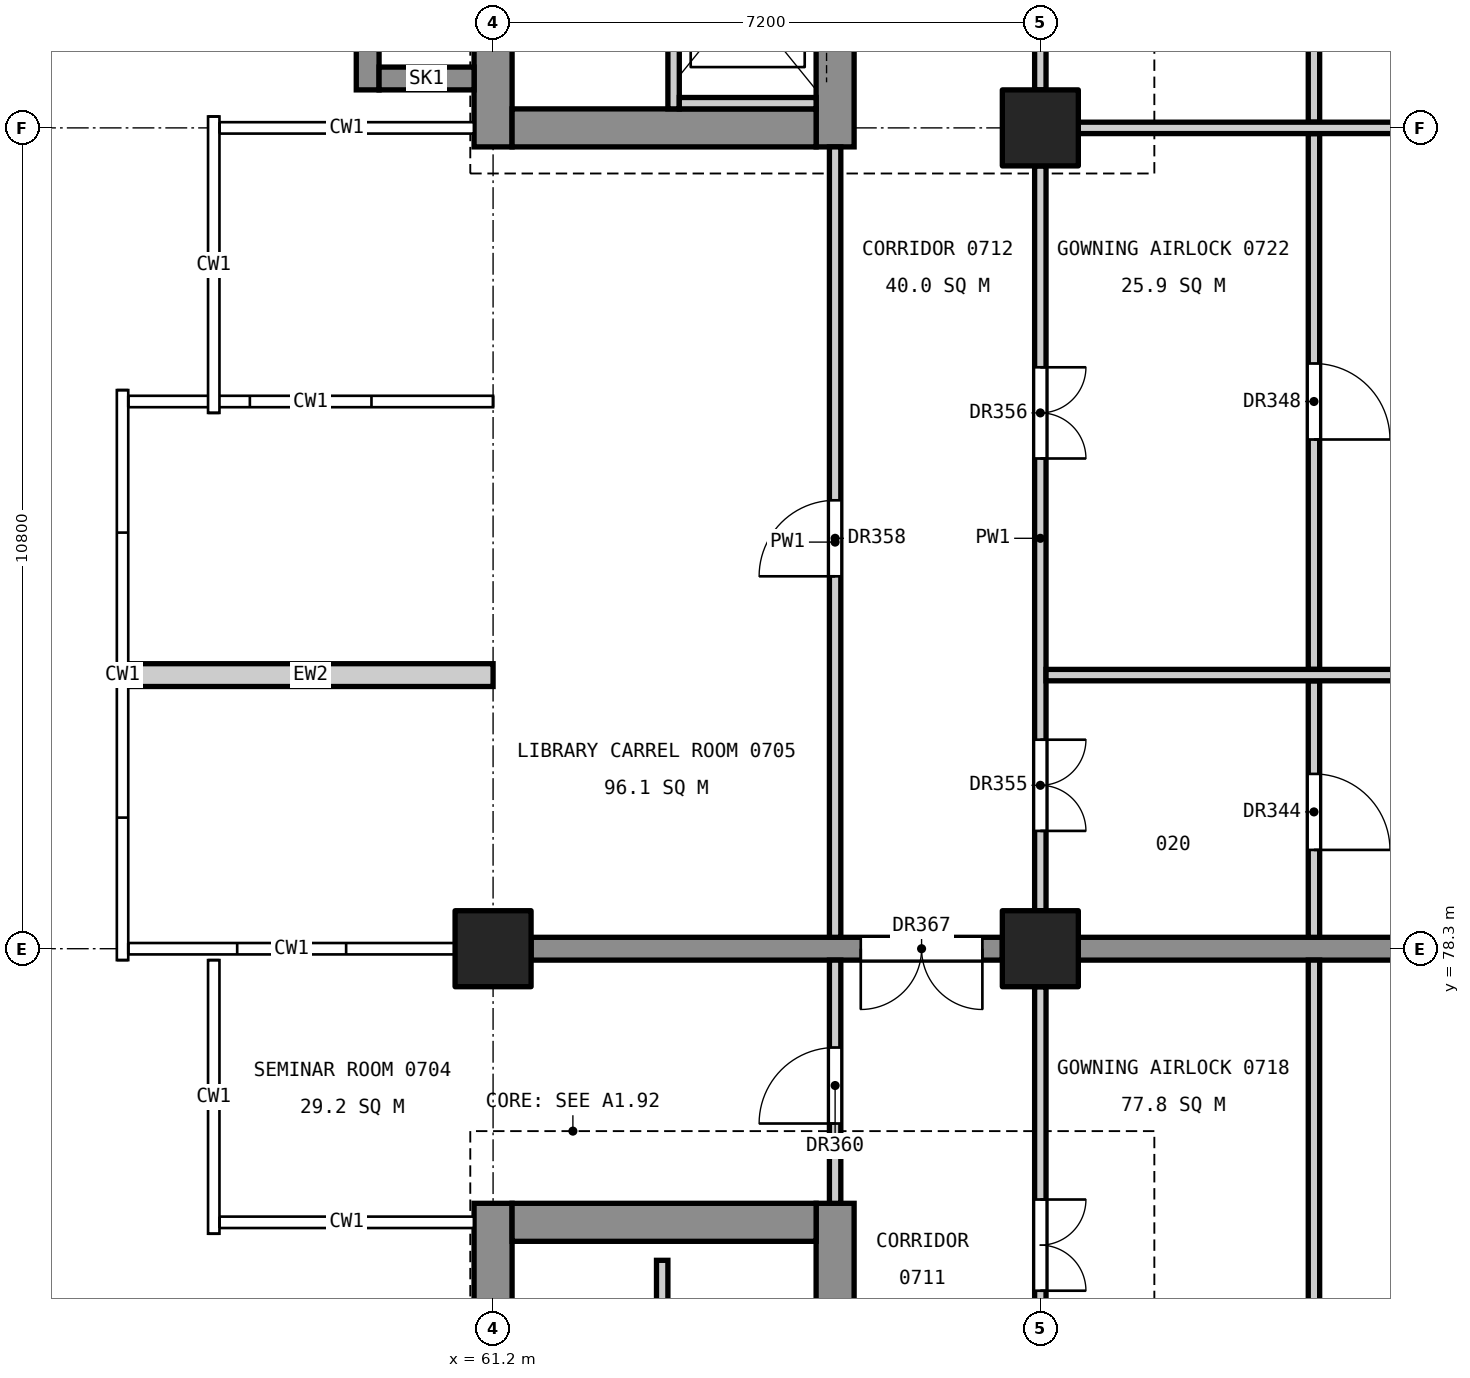
"""IFC4 building model, lengths in metres.
Left out: names, types, materials, properties, quantities, classifications, styles, units other than length and angle.
Written with IfcOpenShell. Run it as: python <this file> out.ifc"""

import sys

from ifc_helpers import new_model, si_unit, direction, frame, frame_2d, origin, origin_2d, place, context, subcontext, project, spatial, rectangle, extrude, element, fill, save


model = new_model("IFC4")
c1 = context("Model", 3, precision=1e-05, world=origin(), true_north=direction((0.0, 1.0)))
c2 = subcontext(c1, "Body", "Model", "MODEL_VIEW")
j1 = project(units=[si_unit("LENGTHUNIT", "METRE"), si_unit("PLANEANGLEUNIT", "RADIAN")], contexts=[c1])
p1 = place(None, origin())
s1 = spatial("IfcSite", under=j1, at=p1, CompositionType="ELEMENT")
p2 = place(p1, origin())
s2 = spatial("IfcBuilding", under=s1, at=p2, CompositionType="ELEMENT")
p3 = place(p2, frame((0.0, 0.0, 36.6)))
s3 = spatial("IfcBuildingStorey", under=s2, at=p3, CompositionType="ELEMENT", Elevation=36.6)
for number, where, z_axis, x_axis in (
    (1, (61.2, 78.3, 0.0), (0.0, 0.0, 1.0), (1.0, 0.0, 0.0)),
    (2, (68.4, 78.3, 0.0), (0.0, 0.0, 1.0), (1.0, 0.0, 0.0)),
    (3, (68.4, 89.1, 0.0), (0.0, 0.0, 1.0), (1.0, 0.0, 0.0)),
):
    element("IfcColumn", number, at=place(p3, frame(where, z_axis=z_axis, x_axis=x_axis)), inside=s3, PredefinedType="COLUMN", context=c2, shape_type="SweptSolid", body=[
        extrude(rectangle(XDim=1.0, YDim=1.0, at=origin_2d()), origin(), (0.0, 0.0, 1.0), 4.8),
    ])
p4 = place(p3, frame((61.2, 60.05, 0.0), z_axis=(0.0, 0.0, 1.0), x_axis=(0.0, 1.0, 0.0)))
e4 = element("IfcWall", 4, at=p4, inside=s3, PredefinedType="SHEAR", context=c2, shape_type="SweptSolid", body=[
    extrude(rectangle(XDim=14.9, YDim=0.5, at=frame_2d((7.45, 0.0))), origin(), (0.0, 0.0, 1.0), 4.55),
])
p5 = place(p4, frame((6.16, 0.0, 3.4)))
e5 = element("IfcOpeningElement", 5, at=p5, cuts=e4, PredefinedType="OPENING", context=c2, shape_type="SweptSolid", body=[
    extrude(rectangle(XDim=1.2, YDim=0.9, at=frame_2d((0.6, 0.45))), frame((0.0, 0.26, 0.0), z_axis=(0.0, -1.0, 0.0), x_axis=(1.0, 0.0, 0.0)), (0.0, 0.0, 1.0), 0.52),
])
p6 = place(p3, frame((65.7, 60.05, 0.0), z_axis=(0.0, 0.0, 1.0), x_axis=(0.0, 1.0, 0.0)))
e6 = element("IfcWall", 6, at=p6, inside=s3, PredefinedType="SHEAR", context=c2, shape_type="SweptSolid", body=[
    extrude(rectangle(XDim=14.9, YDim=0.5, at=frame_2d((7.45, 0.0))), origin(), (0.0, 0.0, 1.0), 4.55),
])
p7 = place(p6, frame((0.55, 0.0, 0.0)))
e7 = element("IfcOpeningElement", 7, at=p7, cuts=e6, PredefinedType="OPENING", context=c2, shape_type="SweptSolid", body=[
    extrude(rectangle(XDim=1.4, YDim=2.1, at=frame_2d((0.7, 1.05))), frame((0.0, 0.26, 0.0), z_axis=(0.0, -1.0, 0.0), x_axis=(1.0, 0.0, 0.0)), (0.0, 0.0, 1.0), 0.52),
])
p8 = place(p6, frame((8.85, 0.0, 0.0)))
e8 = element("IfcOpeningElement", 8, at=p8, cuts=e6, PredefinedType="OPENING", context=c2, shape_type="SweptSolid", body=[
    extrude(rectangle(XDim=1.1, YDim=2.1, at=frame_2d((0.55, 1.05))), frame((0.0, 0.26, 0.0), z_axis=(0.0, -1.0, 0.0), x_axis=(1.0, 0.0, 0.0)), (0.0, 0.0, 1.0), 0.52),
])
p9 = place(p6, frame((11.4, 0.0, 0.0)))
e9 = element("IfcOpeningElement", 9, at=p9, cuts=e6, PredefinedType="OPENING", context=c2, shape_type="SweptSolid", body=[
    extrude(rectangle(XDim=1.1, YDim=2.1, at=frame_2d((0.55, 1.05))), frame((0.0, 0.26, 0.0), z_axis=(0.0, -1.0, 0.0), x_axis=(1.0, 0.0, 0.0)), (0.0, 0.0, 1.0), 0.52),
])
p10 = place(p3, frame((61.45, 74.7, 0.0), z_axis=(0.0, 0.0, 1.0), x_axis=(1.0, 0.0, 0.0)))
e10 = element("IfcWall", 10, at=p10, inside=s3, PredefinedType="SHEAR", context=c2, shape_type="SweptSolid", body=[
    extrude(rectangle(XDim=4.0, YDim=0.5, at=frame_2d((2.0, 0.0))), origin(), (0.0, 0.0, 1.0), 4.55),
])
p11 = place(p3, frame((61.2, 88.85, 0.0), z_axis=(0.0, 0.0, 1.0), x_axis=(0.0, 1.0, 0.0)))
e11 = element("IfcWall", 11, at=p11, inside=s3, PredefinedType="SHEAR", context=c2, shape_type="SweptSolid", body=[
    extrude(rectangle(XDim=11.3, YDim=0.5, at=frame_2d((5.65, 0.0))), origin(), (0.0, 0.0, 1.0), 4.55),
])
p12 = place(p11, frame((3.94, 0.0, 3.4)))
e12 = element("IfcOpeningElement", 12, at=p12, cuts=e11, PredefinedType="OPENING", context=c2, shape_type="SweptSolid", body=[
    extrude(rectangle(XDim=1.2, YDim=0.9, at=frame_2d((0.6, 0.45))), frame((0.0, 0.26, 0.0), z_axis=(0.0, -1.0, 0.0), x_axis=(1.0, 0.0, 0.0)), (0.0, 0.0, 1.0), 0.52),
])
p13 = place(p3, frame((65.7, 88.85, 0.0), z_axis=(0.0, 0.0, 1.0), x_axis=(0.0, 1.0, 0.0)))
e13 = element("IfcWall", 13, at=p13, inside=s3, PredefinedType="SHEAR", context=c2, shape_type="SweptSolid", body=[
    extrude(rectangle(XDim=11.3, YDim=0.5, at=frame_2d((5.65, 0.0))), origin(), (0.0, 0.0, 1.0), 4.55),
])
p14 = place(p13, frame((9.35, 0.0, 0.0)))
e14 = element("IfcOpeningElement", 14, at=p14, cuts=e13, PredefinedType="OPENING", context=c2, shape_type="SweptSolid", body=[
    extrude(rectangle(XDim=1.4, YDim=2.1, at=frame_2d((0.7, 1.05))), frame((0.0, 0.26, 0.0), z_axis=(0.0, -1.0, 0.0), x_axis=(1.0, 0.0, 0.0)), (0.0, 0.0, 1.0), 0.52),
])
p15 = place(p13, frame((1.4, 0.0, 0.0)))
e15 = element("IfcOpeningElement", 15, at=p15, cuts=e13, PredefinedType="OPENING", context=c2, shape_type="SweptSolid", body=[
    extrude(rectangle(XDim=1.1, YDim=2.1, at=frame_2d((0.55, 1.05))), frame((0.0, 0.26, 0.0), z_axis=(0.0, -1.0, 0.0), x_axis=(1.0, 0.0, 0.0)), (0.0, 0.0, 1.0), 0.52),
])
p16 = place(p3, frame((61.45, 89.1, 0.0), z_axis=(0.0, 0.0, 1.0), x_axis=(1.0, 0.0, 0.0)))
e16 = element("IfcWall", 16, at=p16, inside=s3, PredefinedType="SHEAR", context=c2, shape_type="SweptSolid", body=[
    extrude(rectangle(XDim=4.0, YDim=0.5, at=frame_2d((2.0, 0.0))), origin(), (0.0, 0.0, 1.0), 4.55),
])
p17 = place(p3, frame((59.55, 89.6, 0.0), z_axis=(0.0, 0.0, 1.0), x_axis=(0.0, 1.0, 0.0)))
e17 = element("IfcWall", 17, at=p17, inside=s3, PredefinedType="SHEAR", context=c2, shape_type="SweptSolid", body=[
    extrude(rectangle(XDim=2.4, YDim=0.3, at=frame_2d((1.2, 0.0))), origin(), (0.0, 0.0, 1.0), 4.8),
])
p18 = place(p3, frame((60.95, 89.75, 0.0), z_axis=(0.0, 0.0, 1.0), x_axis=(-1.0, 0.0, 0.0)))
e18 = element("IfcWall", 18, at=p18, inside=s3, PredefinedType="SHEAR", context=c2, shape_type="SweptSolid", body=[
    extrude(rectangle(XDim=1.25, YDim=0.3, at=frame_2d((0.625, 0.0))), origin(), (0.0, 0.0, 1.0), 4.8),
])
p19 = place(p3, frame((61.7, 78.3, 0.0), z_axis=(0.0, 0.0, 1.0), x_axis=(1.0, 0.0, 0.0)))
e19 = element("IfcWall", 19, at=p19, inside=s3, PredefinedType="SHEAR", context=c2, shape_type="SweptSolid", body=[
    extrude(rectangle(XDim=6.2, YDim=0.3, at=frame_2d((3.1, 0.0))), origin(), (0.0, 0.0, 1.0), 4.55),
])
p20 = place(p19, frame((4.337, 0.0, 0.0)))
e20 = element("IfcOpeningElement", 20, at=p20, cuts=e19, PredefinedType="OPENING", context=c2, shape_type="SweptSolid", body=[
    extrude(rectangle(XDim=1.6, YDim=2.1, at=frame_2d((0.8, 1.05))), frame((0.0, 0.16, 0.0), z_axis=(0.0, -1.0, 0.0), x_axis=(1.0, 0.0, 0.0)), (0.0, 0.0, 1.0), 0.32),
])
p21 = place(p3, frame((68.9, 78.3, 0.0), z_axis=(0.0, 0.0, 1.0), x_axis=(1.0, 0.0, 0.0)))
e21 = element("IfcWall", 21, at=p21, inside=s3, PredefinedType="SHEAR", context=c2, shape_type="SweptSolid", body=[
    extrude(rectangle(XDim=9.8, YDim=0.3, at=frame_2d((4.9, 0.0))), origin(), (0.0, 0.0, 1.0), 4.55),
])
p22 = place(p3, frame((63.575, 92.0, 0.0), z_axis=(0.0, 0.0, 1.0), x_axis=(0.0, -1.0, 0.0)))
e22 = element("IfcWall", 22, at=p22, inside=s3, PredefinedType="SOLIDWALL", context=c2, shape_type="SweptSolid", body=[
    extrude(rectangle(XDim=2.65, YDim=0.15, at=frame_2d((1.325, 0.0))), origin(), (0.0, 0.0, 1.0), 4.8),
])
p23 = place(p3, frame((63.65, 89.425, 0.0), z_axis=(0.0, 0.0, 1.0), x_axis=(1.0, 0.0, 0.0)))
e23 = element("IfcWall", 23, at=p23, inside=s3, PredefinedType="SOLIDWALL", context=c2, shape_type="SweptSolid", body=[
    extrude(rectangle(XDim=1.8, YDim=0.15, at=frame_2d((0.9, 0.0))), origin(), (0.0, 0.0, 1.0), 4.8),
])
p24 = place(p3, frame((63.425, 73.3, 0.0), z_axis=(0.0, 0.0, 1.0), x_axis=(0.0, 1.0, 0.0)))
e24 = element("IfcWall", 24, at=p24, inside=s3, PredefinedType="SOLIDWALL", context=c2, shape_type="SweptSolid", body=[
    extrude(rectangle(XDim=0.9, YDim=0.15, at=frame_2d((0.45, 0.0))), origin(), (0.0, 0.0, 1.0), 4.8),
])
p25 = place(p3, frame((56.4, 81.9, 0.0), z_axis=(0.0, 0.0, 1.0), x_axis=(1.0, 0.0, 0.0)))
e25 = element("IfcWall", 25, at=p25, inside=s3, PredefinedType="STANDARD", context=c2, shape_type="SweptSolid", body=[
    extrude(rectangle(XDim=4.8, YDim=0.3, at=frame_2d((2.4, 0.0))), origin(), (0.0, 0.0, 1.0), 3.65),
])
p26 = place(p3, frame((65.7, 74.95, 0.0), z_axis=(0.0, 0.0, 1.0), x_axis=(0.0, 1.0, 0.0)))
e26 = element("IfcWall", 26, at=p26, inside=s3, PredefinedType="PARTITIONING", context=c2, shape_type="SweptSolid", body=[
    extrude(rectangle(XDim=3.2, YDim=0.15, at=frame_2d((1.6, 0.0))), origin(), (0.0, 0.0, 1.0), 3.55),
])
p27 = place(p26, frame((1.05, 0.0, 0.0)))
e27 = element("IfcOpeningElement", 27, at=p27, cuts=e26, PredefinedType="OPENING", context=c2, shape_type="SweptSolid", body=[
    extrude(rectangle(XDim=1.0, YDim=2.1, at=frame_2d((0.5, 1.05))), frame((0.0, 0.085, 0.0), z_axis=(0.0, -1.0, 0.0), x_axis=(1.0, 0.0, 0.0)), (0.0, 0.0, 1.0), 0.17),
])
p28 = place(p3, frame((65.7, 78.45, 0.0), z_axis=(0.0, 0.0, 1.0), x_axis=(0.0, 1.0, 0.0)))
e28 = element("IfcWall", 28, at=p28, inside=s3, PredefinedType="PARTITIONING", context=c2, shape_type="SweptSolid", body=[
    extrude(rectangle(XDim=10.4, YDim=0.15, at=frame_2d((5.2, 0.0))), origin(), (0.0, 0.0, 1.0), 3.55),
])
p29 = place(p28, frame((4.75, 0.0, 0.0)))
e29 = element("IfcOpeningElement", 29, at=p29, cuts=e28, PredefinedType="OPENING", context=c2, shape_type="SweptSolid", body=[
    extrude(rectangle(XDim=1.0, YDim=2.1, at=frame_2d((0.5, 1.05))), frame((0.0, 0.085, 0.0), z_axis=(0.0, -1.0, 0.0), x_axis=(1.0, 0.0, 0.0)), (0.0, 0.0, 1.0), 0.17),
])
p30 = place(p3, frame((68.4, 70.8, 0.0), z_axis=(0.0, 0.0, 1.0), x_axis=(0.0, 1.0, 0.0)))
e30 = element("IfcWall", 30, at=p30, inside=s3, PredefinedType="PARTITIONING", context=c2, shape_type="SweptSolid", body=[
    extrude(rectangle(XDim=7.0, YDim=0.15, at=frame_2d((3.5, 0.0))), origin(), (0.0, 0.0, 1.0), 3.55),
])
p31 = place(p30, frame((3.0, 0.0, 0.0)))
e31 = element("IfcOpeningElement", 31, at=p31, cuts=e30, PredefinedType="OPENING", context=c2, shape_type="SweptSolid", body=[
    extrude(rectangle(XDim=1.2, YDim=2.1, at=frame_2d((0.6, 1.05))), frame((0.0, 0.085, 0.0), z_axis=(0.0, -1.0, 0.0), x_axis=(1.0, 0.0, 0.0)), (0.0, 0.0, 1.0), 0.17),
])
p32 = place(p3, frame((68.4, 78.8, 0.0), z_axis=(0.0, 0.0, 1.0), x_axis=(0.0, 1.0, 0.0)))
e32 = element("IfcWall", 32, at=p32, inside=s3, PredefinedType="PARTITIONING", context=c2, shape_type="SweptSolid", body=[
    extrude(rectangle(XDim=9.8, YDim=0.15, at=frame_2d((4.9, 0.0))), origin(), (0.0, 0.0, 1.0), 3.55),
])
p33 = place(p32, frame((1.05, 0.0, 0.0)))
e33 = element("IfcOpeningElement", 33, at=p33, cuts=e32, PredefinedType="OPENING", context=c2, shape_type="SweptSolid", body=[
    extrude(rectangle(XDim=1.2, YDim=2.1, at=frame_2d((0.6, 1.05))), frame((0.0, 0.085, 0.0), z_axis=(0.0, -1.0, 0.0), x_axis=(1.0, 0.0, 0.0)), (0.0, 0.0, 1.0), 0.17),
])
p34 = place(p32, frame((5.95, 0.0, 0.0)))
e34 = element("IfcOpeningElement", 34, at=p34, cuts=e32, PredefinedType="OPENING", context=c2, shape_type="SweptSolid", body=[
    extrude(rectangle(XDim=1.2, YDim=2.1, at=frame_2d((0.6, 1.05))), frame((0.0, 0.085, 0.0), z_axis=(0.0, -1.0, 0.0), x_axis=(1.0, 0.0, 0.0)), (0.0, 0.0, 1.0), 0.17),
])
p35 = place(p3, frame((68.4, 89.6, 0.0), z_axis=(0.0, 0.0, 1.0), x_axis=(0.0, 1.0, 0.0)))
e35 = element("IfcWall", 35, at=p35, inside=s3, PredefinedType="PARTITIONING", context=c2, shape_type="SweptSolid", body=[
    extrude(rectangle(XDim=3.5, YDim=0.15, at=frame_2d((1.75, 0.0))), origin(), (0.0, 0.0, 1.0), 3.55),
])
p36 = place(p35, frame((1.25, 0.0, 0.0)))
e36 = element("IfcOpeningElement", 36, at=p36, cuts=e35, PredefinedType="OPENING", context=c2, shape_type="SweptSolid", body=[
    extrude(rectangle(XDim=1.2, YDim=2.1, at=frame_2d((0.6, 1.05))), frame((0.0, 0.085, 0.0), z_axis=(0.0, -1.0, 0.0), x_axis=(1.0, 0.0, 0.0)), (0.0, 0.0, 1.0), 0.17),
])
p37 = place(p3, frame((72.0, 56.85, 0.0), z_axis=(0.0, 0.0, 1.0), x_axis=(0.0, 1.0, 0.0)))
e37 = element("IfcWall", 37, at=p37, inside=s3, PredefinedType="PARTITIONING", context=c2, shape_type="SweptSolid", body=[
    extrude(rectangle(XDim=21.3, YDim=0.15, at=frame_2d((10.65, 0.0))), origin(), (0.0, 0.0, 1.0), 3.55),
])
p38 = place(p37, frame((10.15, 0.0, 0.0)))
e38 = element("IfcOpeningElement", 38, at=p38, cuts=e37, PredefinedType="OPENING", context=c2, shape_type="SweptSolid", body=[
    extrude(rectangle(XDim=1.0, YDim=2.1, at=frame_2d((0.5, 1.05))), frame((0.0, 0.085, 0.0), z_axis=(0.0, -1.0, 0.0), x_axis=(1.0, 0.0, 0.0)), (0.0, 0.0, 1.0), 0.17),
])
p39 = place(p3, frame((72.0, 78.45, 0.0), z_axis=(0.0, 0.0, 1.0), x_axis=(0.0, 1.0, 0.0)))
e39 = element("IfcWall", 39, at=p39, inside=s3, PredefinedType="PARTITIONING", context=c2, shape_type="SweptSolid", body=[
    extrude(rectangle(XDim=3.375, YDim=0.15, at=frame_2d((1.688, 0.0))), origin(), (0.0, 0.0, 1.0), 3.55),
])
p40 = place(p39, frame((1.15, 0.0, 0.0)))
e40 = element("IfcOpeningElement", 40, at=p40, cuts=e39, PredefinedType="OPENING", context=c2, shape_type="SweptSolid", body=[
    extrude(rectangle(XDim=1.0, YDim=2.1, at=frame_2d((0.5, 1.05))), frame((0.0, 0.085, 0.0), z_axis=(0.0, -1.0, 0.0), x_axis=(1.0, 0.0, 0.0)), (0.0, 0.0, 1.0), 0.17),
])
p41 = place(p3, frame((72.0, 81.975, 0.0), z_axis=(0.0, 0.0, 1.0), x_axis=(0.0, 1.0, 0.0)))
e41 = element("IfcWall", 41, at=p41, inside=s3, PredefinedType="PARTITIONING", context=c2, shape_type="SweptSolid", body=[
    extrude(rectangle(XDim=7.05, YDim=0.15, at=frame_2d((3.525, 0.0))), origin(), (0.0, 0.0, 1.0), 3.55),
])
p42 = place(p41, frame((3.025, 0.0, 0.0)))
e42 = element("IfcOpeningElement", 42, at=p42, cuts=e41, PredefinedType="OPENING", context=c2, shape_type="SweptSolid", body=[
    extrude(rectangle(XDim=1.0, YDim=2.1, at=frame_2d((0.5, 1.05))), frame((0.0, 0.085, 0.0), z_axis=(0.0, -1.0, 0.0), x_axis=(1.0, 0.0, 0.0)), (0.0, 0.0, 1.0), 0.17),
])
p43 = place(p3, frame((72.0, 89.175, 0.0), z_axis=(0.0, 0.0, 1.0), x_axis=(0.0, 1.0, 0.0)))
e43 = element("IfcWall", 43, at=p43, inside=s3, PredefinedType="PARTITIONING", context=c2, shape_type="SweptSolid", body=[
    extrude(rectangle(XDim=10.575, YDim=0.15, at=frame_2d((5.288, 0.0))), origin(), (0.0, 0.0, 1.0), 3.55),
])
p44 = place(p43, frame((4.825, 0.0, 0.0)))
e44 = element("IfcOpeningElement", 44, at=p44, cuts=e43, PredefinedType="OPENING", context=c2, shape_type="SweptSolid", body=[
    extrude(rectangle(XDim=1.0, YDim=2.1, at=frame_2d((0.5, 1.05))), frame((0.0, 0.085, 0.0), z_axis=(0.0, -1.0, 0.0), x_axis=(1.0, 0.0, 0.0)), (0.0, 0.0, 1.0), 0.17),
])
p45 = place(p3, frame((68.475, 81.9, 0.0), z_axis=(0.0, 0.0, 1.0), x_axis=(1.0, 0.0, 0.0)))
e45 = element("IfcWall", 45, at=p45, inside=s3, PredefinedType="PARTITIONING", context=c2, shape_type="SweptSolid", body=[
    extrude(rectangle(XDim=10.575, YDim=0.15, at=frame_2d((5.288, 0.0))), origin(), (0.0, 0.0, 1.0), 3.85),
])
p46 = place(p3, frame((68.9, 89.1, 0.0), z_axis=(0.0, 0.0, 1.0), x_axis=(1.0, 0.0, 0.0)))
e46 = element("IfcWall", 46, at=p46, inside=s3, PredefinedType="PARTITIONING", context=c2, shape_type="SweptSolid", body=[
    extrude(rectangle(XDim=9.8, YDim=0.15, at=frame_2d((4.9, 0.0))), origin(), (0.0, 0.0, 1.0), 3.85),
])
p47 = place(p40, frame((1.0, 0.0, 0.0), z_axis=(0.0, 0.0, 1.0), x_axis=(-1.0, 0.0, 0.0)))
e47 = element("IfcDoor", 47, at=p47, inside=s3, OperationType="SINGLE_SWING_RIGHT", PredefinedType="DOOR", context=c2, shape_type="SweptSolid", body=[
    extrude(rectangle(XDim=1.0, YDim=2.1, at=frame_2d((0.5, 1.05))), frame((0.0, 0.025, 0.0), z_axis=(0.0, -1.0, 0.0), x_axis=(1.0, 0.0, 0.0)), (0.0, 0.0, 1.0), 0.05),
])
fill(e40, e47)
p48 = place(p42, frame((1.0, 0.0, 0.0), z_axis=(0.0, 0.0, 1.0), x_axis=(-1.0, 0.0, 0.0)))
e48 = element("IfcDoor", 48, at=p48, inside=s3, OperationType="SINGLE_SWING_RIGHT", PredefinedType="DOOR", context=c2, shape_type="SweptSolid", body=[
    extrude(rectangle(XDim=1.0, YDim=2.1, at=frame_2d((0.5, 1.05))), frame((0.0, 0.025, 0.0), z_axis=(0.0, -1.0, 0.0), x_axis=(1.0, 0.0, 0.0)), (0.0, 0.0, 1.0), 0.05),
])
fill(e42, e48)
p49 = place(p31, frame((1.2, 0.0, 0.0), z_axis=(0.0, 0.0, 1.0), x_axis=(-1.0, 0.0, 0.0)))
e49 = element("IfcDoor", 49, at=p49, inside=s3, OperationType="DOUBLE_DOOR_SINGLE_SWING", PredefinedType="DOOR", context=c2, shape_type="SweptSolid", body=[
    extrude(rectangle(XDim=1.2, YDim=2.1, at=frame_2d((0.6, 1.05))), frame((0.0, 0.025, 0.0), z_axis=(0.0, -1.0, 0.0), x_axis=(1.0, 0.0, 0.0)), (0.0, 0.0, 1.0), 0.05),
])
fill(e31, e49)
p50 = place(p33, frame((1.2, 0.0, 0.0), z_axis=(0.0, 0.0, 1.0), x_axis=(-1.0, 0.0, 0.0)))
e50 = element("IfcDoor", 50, at=p50, inside=s3, OperationType="DOUBLE_DOOR_SINGLE_SWING", PredefinedType="DOOR", context=c2, shape_type="SweptSolid", body=[
    extrude(rectangle(XDim=1.2, YDim=2.1, at=frame_2d((0.6, 1.05))), frame((0.0, 0.025, 0.0), z_axis=(0.0, -1.0, 0.0), x_axis=(1.0, 0.0, 0.0)), (0.0, 0.0, 1.0), 0.05),
])
fill(e33, e50)
p51 = place(p34, frame((1.2, 0.0, 0.0), z_axis=(0.0, 0.0, 1.0), x_axis=(-1.0, 0.0, 0.0)))
e51 = element("IfcDoor", 51, at=p51, inside=s3, OperationType="DOUBLE_DOOR_SINGLE_SWING", PredefinedType="DOOR", context=c2, shape_type="SweptSolid", body=[
    extrude(rectangle(XDim=1.2, YDim=2.1, at=frame_2d((0.6, 1.05))), frame((0.0, 0.025, 0.0), z_axis=(0.0, -1.0, 0.0), x_axis=(1.0, 0.0, 0.0)), (0.0, 0.0, 1.0), 0.05),
])
fill(e34, e51)
p52 = place(p29, origin())
e52 = element("IfcDoor", 52, at=p52, inside=s3, OperationType="SINGLE_SWING_LEFT", PredefinedType="DOOR", context=c2, shape_type="SweptSolid", body=[
    extrude(rectangle(XDim=1.0, YDim=2.1, at=frame_2d((0.5, 1.05))), frame((0.0, 0.025, 0.0), z_axis=(0.0, -1.0, 0.0), x_axis=(1.0, 0.0, 0.0)), (0.0, 0.0, 1.0), 0.05),
])
fill(e29, e52)
p53 = place(p27, origin())
e53 = element("IfcDoor", 53, at=p53, inside=s3, OperationType="SINGLE_SWING_LEFT", PredefinedType="DOOR", context=c2, shape_type="SweptSolid", body=[
    extrude(rectangle(XDim=1.0, YDim=2.1, at=frame_2d((0.5, 1.05))), frame((0.0, 0.025, 0.0), z_axis=(0.0, -1.0, 0.0), x_axis=(1.0, 0.0, 0.0)), (0.0, 0.0, 1.0), 0.05),
])
fill(e27, e53)
p54 = place(p20, frame((1.6, 0.0, 0.0), z_axis=(0.0, 0.0, 1.0), x_axis=(-1.0, 0.0, 0.0)))
e54 = element("IfcDoor", 54, at=p54, inside=s3, OperationType="DOUBLE_DOOR_SINGLE_SWING", PredefinedType="DOOR", context=c2, shape_type="SweptSolid", body=[
    extrude(rectangle(XDim=1.6, YDim=2.1, at=frame_2d((0.8, 1.05))), frame((0.0, 0.025, 0.0), z_axis=(0.0, -1.0, 0.0), x_axis=(1.0, 0.0, 0.0)), (0.0, 0.0, 1.0), 0.05),
])
fill(e20, e54)
save(model, sys.argv[1])
